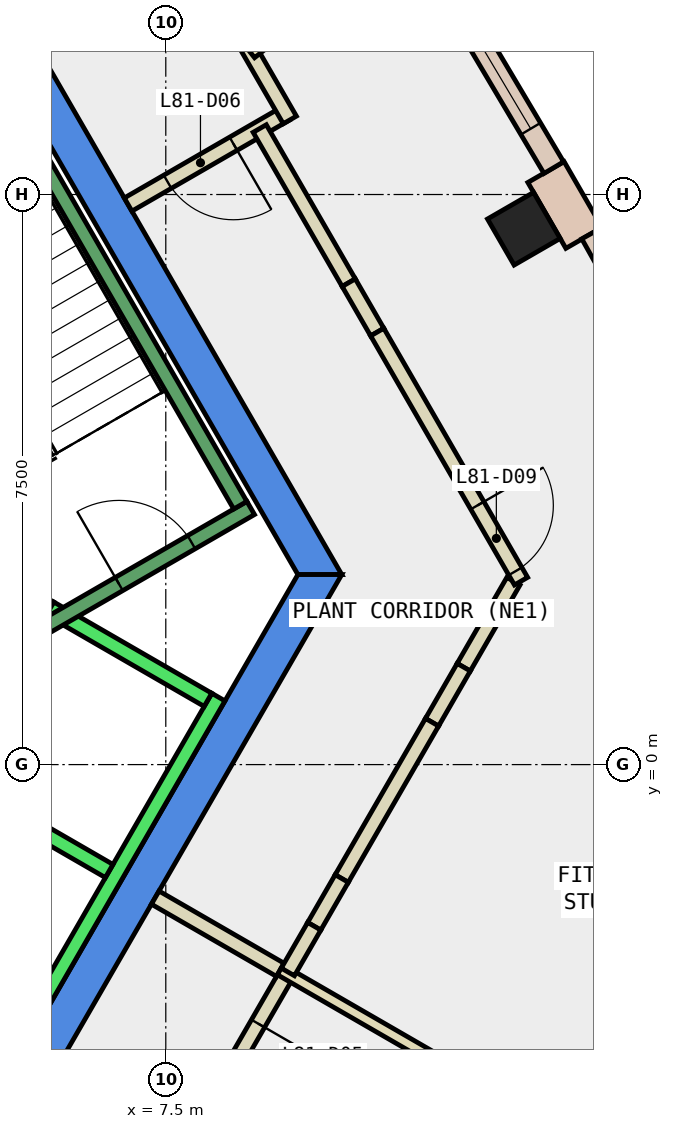
"""IFC4 building model, lengths in metres.
Left out: names, types, materials, properties, quantities, classifications, styles, units other than length and angle.
Written with IfcOpenShell. Run it as: python <this file> out.ifc"""

import sys

from ifc_helpers import new_model, si_unit, direction, frame, frame_2d, origin, origin_2d, place, context, subcontext, project, spatial, polyline, rectangle, outline, extrude, element, fill, save


model = new_model("IFC4")
c1 = context("Model", 3, precision=1e-05, world=origin(), true_north=direction((0.0, 1.0)))
c2 = subcontext(c1, "Body", "Model", "MODEL_VIEW")
j1 = project(units=[si_unit("LENGTHUNIT", "METRE"), si_unit("PLANEANGLEUNIT", "RADIAN")], contexts=[c1])
p1 = place(None, origin())
s1 = spatial("IfcSite", under=j1, at=p1, CompositionType="ELEMENT")
p2 = place(p1, origin())
s2 = spatial("IfcBuilding", under=s1, at=p2, CompositionType="ELEMENT")
p3 = place(p2, frame((0.0, 0.0, 344.9)))
s3 = spatial("IfcBuildingStorey", under=s2, at=p3, CompositionType="ELEMENT", Elevation=344.9)
p4 = place(p3, frame((12.211, 7.05, -0.35), z_axis=(0.0, 0.0, 1.0), x_axis=(-0.5, 0.866025403784, 0.0)))
e1 = element("IfcColumn", 1, at=p4, inside=s3, PredefinedType="COLUMN", context=c2, shape_type="SweptSolid", body=[
    extrude(rectangle(XDim=0.7, YDim=0.7, at=origin_2d()), origin(), (0.0, 0.0, 1.0), 4.4),
])
p5 = place(p3, frame((0.0, 0.0, -0.35)))
e2 = element("IfcWall", 2, at=p5, inside=s3, PredefinedType="SHEAR", context=c2, shape_type="SweptSolid", body=[
    extrude(outline(polyline([(5.486, 9.998), (5.053, 9.748), (9.238, 2.5), (9.815, 2.5), (5.486, 9.998)])), origin(), (0.0, 0.0, 1.0), 4.4),
])
p6 = place(p3, frame((0.0, 0.0, -0.35)))
e3 = element("IfcWall", 3, at=p6, inside=s3, PredefinedType="SHEAR", context=c2, shape_type="SweptSolid", body=[
    extrude(outline(polyline([(4.907, -6.0), (9.815, 2.5), (9.238, 2.5), (4.619, -5.5), (4.907, -6.0)])), origin(), (0.0, 0.0, 1.0), 4.4),
])
p7 = place(p3, frame((13.002, 6.929, 0.0), z_axis=(0.0, 0.0, 1.0), x_axis=(-0.49960277677, 0.866254619292, 0.0)))
e4 = element("IfcWall", 4, at=p7, inside=s3, PredefinedType="STANDARD", context=c2, shape_type="SweptSolid", body=[
    extrude(rectangle(XDim=1.001, YDim=0.55, at=frame_2d((0.5, 0.0))), origin(), (0.0, 0.0, 1.0), 4.05),
])
p8 = place(p3, frame((16.225, 1.426, 0.0), z_axis=(0.0, 0.0, 1.0), x_axis=(-0.489232514948, 0.872153396094, 0.0)))
e5 = element("IfcWall", 5, at=p8, inside=s3, PredefinedType="STANDARD", context=c2, shape_type="SweptSolid", body=[
    extrude(rectangle(XDim=6.38, YDim=0.3, at=frame_2d((3.19, 0.0))), origin(), (0.0, 0.0, 1.0), 4.05),
])
p9 = place(p8, frame((0.595, 0.0, 0.9)))
e6 = element("IfcOpeningElement", 6, at=p9, cuts=e5, PredefinedType="OPENING", context=c2, shape_type="SweptSolid", body=[
    extrude(rectangle(XDim=2.0, YDim=3.0, at=frame_2d((1.0, 1.5))), frame((0.0, 0.16, 0.0), z_axis=(0.0, -1.0, 0.0), x_axis=(1.0, 0.0, 0.0)), (0.0, 0.0, 1.0), 0.32),
])
p10 = place(p8, frame((3.785, 0.0, 0.9)))
e7 = element("IfcOpeningElement", 7, at=p10, cuts=e5, PredefinedType="OPENING", context=c2, shape_type="SweptSolid", body=[
    extrude(rectangle(XDim=2.0, YDim=3.0, at=frame_2d((1.0, 1.5))), frame((0.0, 0.16, 0.0), z_axis=(0.0, -1.0, 0.0), x_axis=(1.0, 0.0, 0.0)), (0.0, 0.0, 1.0), 0.32),
])
p11 = place(p3, frame((12.605, 7.854, 0.0), z_axis=(0.0, 0.0, 1.0), x_axis=(-0.510686403068, 0.859767060152, 0.0)))
e8 = element("IfcWall", 8, at=p11, inside=s3, PredefinedType="STANDARD", context=c2, shape_type="SweptSolid", body=[
    extrude(rectangle(XDim=6.38, YDim=0.3, at=frame_2d((3.19, 0.0))), origin(), (0.0, 0.0, 1.0), 4.05),
])
p12 = place(p11, frame((0.595, 0.0, 0.9)))
e9 = element("IfcOpeningElement", 9, at=p12, cuts=e8, PredefinedType="OPENING", context=c2, shape_type="SweptSolid", body=[
    extrude(rectangle(XDim=2.0, YDim=3.0, at=frame_2d((1.0, 1.5))), frame((0.0, 0.16, 0.0), z_axis=(0.0, -1.0, 0.0), x_axis=(1.0, 0.0, 0.0)), (0.0, 0.0, 1.0), 0.32),
])
p13 = place(p11, frame((3.785, 0.0, 0.9)))
e10 = element("IfcOpeningElement", 10, at=p13, cuts=e8, PredefinedType="OPENING", context=c2, shape_type="SweptSolid", body=[
    extrude(rectangle(XDim=2.0, YDim=3.0, at=frame_2d((1.0, 1.5))), frame((0.0, 0.16, 0.0), z_axis=(0.0, -1.0, 0.0), x_axis=(1.0, 0.0, 0.0)), (0.0, 0.0, 1.0), 0.32),
])
p14 = place(p3, frame((9.106, -2.728, 0.0), z_axis=(0.0, 0.0, 1.0), x_axis=(-0.500246664097, -0.865882945357, 0.0)))
e11 = element("IfcWall", 11, at=p14, inside=s3, PredefinedType="PARTITIONING", context=c2, shape_type="SweptSolid", body=[
    extrude(rectangle(XDim=1.841, YDim=0.2, at=frame_2d((0.92, 0.0))), origin(), (0.0, 0.0, 1.0), 4.05),
])
p15 = place(p14, frame((0.784, 0.0, 0.0)))
e12 = element("IfcOpeningElement", 12, at=p15, cuts=e11, PredefinedType="OPENING", context=c2, shape_type="SweptSolid", body=[
    extrude(rectangle(XDim=1.0, YDim=2.1, at=frame_2d((0.5, 1.05))), frame((0.0, 0.11, 0.0), z_axis=(0.0, -1.0, 0.0), x_axis=(1.0, 0.0, 0.0)), (0.0, 0.0, 1.0), 0.22),
])
p16 = place(p3, frame((7.361, -1.75, 0.0), z_axis=(0.0, 0.0, 1.0), x_axis=(0.865980106173, -0.500078449558, 0.0)))
e13 = element("IfcWall", 13, at=p16, inside=s3, PredefinedType="PARTITIONING", context=c2, shape_type="SweptSolid", body=[
    extrude(rectangle(XDim=1.9, YDim=0.2, at=frame_2d((0.95, 0.0))), origin(), (0.0, 0.0, 1.0), 4.05),
])
p17 = place(p3, frame((9.082, 8.568, 0.0), z_axis=(0.0, 0.0, 1.0), x_axis=(-0.865955154139, -0.50012165622, 0.0)))
e14 = element("IfcWall", 14, at=p17, inside=s3, PredefinedType="PARTITIONING", context=c2, shape_type="SweptSolid", body=[
    extrude(rectangle(XDim=2.4, YDim=0.2, at=frame_2d((1.2, 0.0))), origin(), (0.0, 0.0, 1.0), 4.05),
])
p18 = place(p17, frame((0.8, 0.0, 0.0)))
e15 = element("IfcOpeningElement", 15, at=p18, cuts=e14, PredefinedType="OPENING", context=c2, shape_type="SweptSolid", body=[
    extrude(rectangle(XDim=1.0, YDim=2.1, at=frame_2d((0.5, 1.05))), frame((0.0, 0.11, 0.0), z_axis=(0.0, -1.0, 0.0), x_axis=(1.0, 0.0, 0.0)), (0.0, 0.0, 1.0), 0.22),
])
p19 = place(p3, frame((8.736, 8.368, 0.0), z_axis=(0.0, 0.0, 1.0), x_axis=(0.500041339179, -0.866001535283, 0.0)))
e16 = element("IfcWall", 16, at=p19, inside=s3, PredefinedType="PARTITIONING", context=c2, shape_type="SweptSolid", body=[
    extrude(rectangle(XDim=2.342, YDim=0.2, at=frame_2d((1.171, 0.0))), origin(), (0.0, 0.0, 1.0), 4.05),
])
p20 = place(p3, frame((12.074, 2.413, 0.0), z_axis=(0.0, 0.0, 1.0), x_axis=(-0.500255820348, -0.86587765545, 0.0)))
e17 = element("IfcWall", 17, at=p20, inside=s3, PredefinedType="PARTITIONING", context=c2, shape_type="SweptSolid", body=[
    extrude(rectangle(XDim=1.307, YDim=0.2, at=frame_2d((0.654, 0.0))), origin(), (0.0, 0.0, 1.0), 4.05),
])
p21 = place(p3, frame((18.416, -8.133, 0.0), z_axis=(0.0, 0.0, 1.0), x_axis=(-0.866013839597, 0.500020029225, 0.0)))
e18 = element("IfcWall", 18, at=p21, inside=s3, PredefinedType="PARTITIONING", context=c2, shape_type="SweptSolid", body=[
    extrude(rectangle(XDim=10.866, YDim=0.15, at=frame_2d((5.433, 0.0))), origin(), (0.0, 0.0, 1.0), 4.05),
])
p22 = place(p3, frame((7.482, 11.339, 0.0), z_axis=(0.0, 0.0, 1.0), x_axis=(0.49999780286, -0.8660266723, 0.0)))
e19 = element("IfcWall", 19, at=p22, inside=s3, PredefinedType="PARTITIONING", context=c2, shape_type="SweptSolid", body=[
    extrude(rectangle(XDim=3.3, YDim=0.2, at=frame_2d((1.65, 0.0))), origin(), (0.0, 0.0, 1.0), 4.05),
])
p23 = place(p22, frame((0.08, 0.0, 0.0)))
e20 = element("IfcOpeningElement", 20, at=p23, cuts=e19, PredefinedType="OPENING", context=c2, shape_type="SweptSolid", body=[
    extrude(rectangle(XDim=1.0, YDim=2.1, at=frame_2d((0.5, 1.05))), frame((0.0, 0.11, 0.0), z_axis=(0.0, -1.0, 0.0), x_axis=(1.0, 0.0, 0.0)), (0.0, 0.0, 1.0), 0.22),
])
p24 = place(p3, frame((9.907, 6.34, 0.0), z_axis=(0.0, 0.0, 1.0), x_axis=(0.499637970844, -0.866234320545, 0.0)))
e21 = element("IfcWall", 21, at=p24, inside=s3, PredefinedType="PARTITIONING", context=c2, shape_type="SweptSolid", body=[
    extrude(rectangle(XDim=0.75, YDim=0.2, at=frame_2d((0.375, 0.0))), origin(), (0.0, 0.0, 1.0), 1.95),
])
p25 = place(p3, frame((10.282, 5.69, 0.0), z_axis=(0.0, 0.0, 1.0), x_axis=(0.500038938992, -0.86600292118, 0.0)))
e22 = element("IfcWall", 22, at=p25, inside=s3, PredefinedType="PARTITIONING", context=c2, shape_type="SweptSolid", body=[
    extrude(rectangle(XDim=3.784, YDim=0.2, at=frame_2d((1.892, 0.0))), origin(), (0.0, 0.0, 1.0), 4.05),
])
p26 = place(p25, frame((2.634, 0.0, 0.0)))
e23 = element("IfcOpeningElement", 23, at=p26, cuts=e22, PredefinedType="OPENING", context=c2, shape_type="SweptSolid", body=[
    extrude(rectangle(XDim=1.0, YDim=2.1, at=frame_2d((0.5, 1.05))), frame((0.0, 0.11, 0.0), z_axis=(0.0, -1.0, 0.0), x_axis=(1.0, 0.0, 0.0)), (0.0, 0.0, 1.0), 0.22),
])
p27 = place(p3, frame((11.42, 1.281, 0.0), z_axis=(0.0, 0.0, 1.0), x_axis=(-0.49903093787, -0.866584169627, 0.0)))
e24 = element("IfcWall", 24, at=p27, inside=s3, PredefinedType="PARTITIONING", context=c2, shape_type="SweptSolid", body=[
    extrude(rectangle(XDim=0.836, YDim=0.2, at=frame_2d((0.418, 0.0))), origin(), (0.0, 0.0, 1.0), 1.95),
])
p28 = place(p3, frame((11.003, 0.557, 0.0), z_axis=(0.0, 0.0, 1.0), x_axis=(-0.500318709804, -0.865841318384, 0.0)))
e25 = element("IfcWall", 25, at=p28, inside=s3, PredefinedType="PARTITIONING", context=c2, shape_type="SweptSolid", body=[
    extrude(rectangle(XDim=2.375, YDim=0.2, at=frame_2d((1.187, 0.0))), origin(), (0.0, 0.0, 1.0), 4.05),
])
p29 = place(p3, frame((9.815, -1.499, 0.0), z_axis=(0.0, 0.0, 1.0), x_axis=(-0.499508606083, -0.866308924373, 0.0)))
e26 = element("IfcWall", 26, at=p29, inside=s3, PredefinedType="PARTITIONING", context=c2, shape_type="SweptSolid", body=[
    extrude(rectangle(XDim=0.725, YDim=0.2, at=frame_2d((0.362, 0.0))), origin(), (0.0, 0.0, 1.0), 1.95),
])
p30 = place(p3, frame((9.453, -2.127, 0.0), z_axis=(0.0, 0.0, 1.0), x_axis=(-0.499884866553, -0.866091865907, 0.0)))
e27 = element("IfcWall", 27, at=p30, inside=s3, PredefinedType="PARTITIONING", context=c2, shape_type="SweptSolid", body=[
    extrude(rectangle(XDim=0.694, YDim=0.2, at=frame_2d((0.347, 0.0))), origin(), (0.0, 0.0, 1.0), 4.05),
])
p31 = place(p3, frame((9.821, 10.276, 0.0), z_axis=(0.0, 0.0, 1.0), x_axis=(-0.784249073328, -0.620446122548, 0.0)))
e28 = element("IfcWall", 28, at=p31, inside=s3, PredefinedType="PARTITIONING", context=c2, shape_type="SweptSolid", body=[
    extrude(rectangle(XDim=1.51, YDim=0.1, at=frame_2d((0.755, 0.0))), origin(), (0.0, 0.0, 1.0), 4.05),
])
p32 = place(p3, frame((3.24, -2.488, 0.0), z_axis=(0.0, 0.0, 1.0), x_axis=(0.500034260056, 0.866005622828, 0.0)))
e29 = element("IfcWall", 29, at=p32, inside=s3, PredefinedType="STANDARD", context=c2, shape_type="SweptSolid", body=[
    extrude(rectangle(XDim=5.399, YDim=0.2, at=frame_2d((2.7, 0.0))), origin(), (0.0, 0.0, 1.0), 4.05),
])
p33 = place(p32, frame((3.225, 0.0, 0.0)))
e30 = element("IfcOpeningElement", 30, at=p33, cuts=e29, PredefinedType="OPENING", context=c2, shape_type="SweptSolid", body=[
    extrude(rectangle(XDim=1.1, YDim=2.1, at=frame_2d((0.55, 1.05))), frame((0.0, 0.11, 0.0), z_axis=(0.0, -1.0, 0.0), x_axis=(1.0, 0.0, 0.0)), (0.0, 0.0, 1.0), 0.22),
])
p34 = place(p32, frame((1.225, 0.0, 0.0)))
e31 = element("IfcOpeningElement", 31, at=p34, cuts=e29, PredefinedType="OPENING", context=c2, shape_type="SweptSolid", body=[
    extrude(rectangle(XDim=1.1, YDim=2.1, at=frame_2d((0.55, 1.05))), frame((0.0, 0.11, 0.0), z_axis=(0.0, -1.0, 0.0), x_axis=(1.0, 0.0, 0.0)), (0.0, 0.0, 1.0), 0.22),
])
p35 = place(p3, frame((5.492, -3.788, 0.0), z_axis=(0.0, 0.0, 1.0), x_axis=(0.500034260056, 0.866005622828, 0.0)))
e32 = element("IfcWall", 32, at=p35, inside=s3, PredefinedType="STANDARD", context=c2, shape_type="SweptSolid", body=[
    extrude(rectangle(XDim=5.399, YDim=0.2, at=frame_2d((2.7, 0.0))), origin(), (0.0, 0.0, 1.0), 4.05),
])
for number, where, z_axis, x_axis in (
    (33, (4.677, -0.2, 0.0), (0.0, 0.0, 1.0), (0.866, -0.5, 0.0)),
    (34, (5.977, 2.052, 0.0), (0.0, 0.0, 1.0), (0.866, -0.5, 0.0)),
):
    element("IfcWall", number, at=place(p3, frame(where, z_axis=z_axis, x_axis=x_axis)), inside=s3, PredefinedType="STANDARD", context=c2, shape_type="SweptSolid", body=[
        extrude(rectangle(XDim=2.399, YDim=0.2, at=frame_2d((1.2, 0.0))), origin(), (0.0, 0.0, 1.0), 4.05),
    ])
p36 = place(p3, frame((4.806, 1.176, 0.0), z_axis=(0.0, 0.0, 1.0), x_axis=(0.866059941101, 0.499940174841, 0.0)))
e35 = element("IfcWall", 35, at=p36, inside=s3, PredefinedType="STANDARD", context=c2, shape_type="SweptSolid", body=[
    extrude(rectangle(XDim=4.4, YDim=0.2, at=frame_2d((2.2, 0.0))), origin(), (0.0, 0.0, 1.0), 4.05),
])
p37 = place(p36, frame((2.4, 0.0, 0.0)))
e36 = element("IfcOpeningElement", 36, at=p37, cuts=e35, PredefinedType="OPENING", context=c2, shape_type="SweptSolid", body=[
    extrude(rectangle(XDim=1.1, YDim=2.2, at=frame_2d((0.55, 1.1))), frame((0.0, 0.11, 0.0), z_axis=(0.0, -1.0, 0.0), x_axis=(1.0, 0.0, 0.0)), (0.0, 0.0, 1.0), 0.22),
])
p38 = place(p3, frame((8.48, 3.412, 0.0), z_axis=(0.0, 0.0, 1.0), x_axis=(-0.499978703459, 0.866037698999, 0.0)))
e37 = element("IfcWall", 37, at=p38, inside=s3, PredefinedType="STANDARD", context=c2, shape_type="SweptSolid", body=[
    extrude(rectangle(XDim=6.9, YDim=0.2, at=frame_2d((3.45, 0.0))), origin(), (0.0, 0.0, 1.0), 4.05),
])
p39 = place(p12, origin())
e38 = element("IfcWindow", 38, at=p39, inside=s3, PartitioningType="SINGLE_PANEL", PredefinedType="WINDOW", context=c2, shape_type="SweptSolid", body=[
    extrude(rectangle(XDim=2.0, YDim=3.0, at=frame_2d((1.0, 1.5))), frame((0.0, 0.03, 0.0), z_axis=(0.0, -1.0, 0.0), x_axis=(1.0, 0.0, 0.0)), (0.0, 0.0, 1.0), 0.06),
])
fill(e9, e38)
p40 = place(p15, origin())
e39 = element("IfcDoor", 39, at=p40, inside=s3, OperationType="SINGLE_SWING_LEFT", PredefinedType="DOOR", context=c2, shape_type="SweptSolid", body=[
    extrude(rectangle(XDim=1.0, YDim=2.1, at=frame_2d((0.5, 1.05))), frame((0.0, 0.025, 0.0), z_axis=(0.0, -1.0, 0.0), x_axis=(1.0, 0.0, 0.0)), (0.0, 0.0, 1.0), 0.05),
])
fill(e12, e39)
p41 = place(p18, origin())
e40 = element("IfcDoor", 40, at=p41, inside=s3, OperationType="SINGLE_SWING_LEFT", PredefinedType="DOOR", context=c2, shape_type="SweptSolid", body=[
    extrude(rectangle(XDim=1.0, YDim=2.1, at=frame_2d((0.5, 1.05))), frame((0.0, 0.025, 0.0), z_axis=(0.0, -1.0, 0.0), x_axis=(1.0, 0.0, 0.0)), (0.0, 0.0, 1.0), 0.05),
])
fill(e15, e40)
p42 = place(p26, origin())
e41 = element("IfcDoor", 41, at=p42, inside=s3, OperationType="SINGLE_SWING_RIGHT", PredefinedType="DOOR", context=c2, shape_type="SweptSolid", body=[
    extrude(rectangle(XDim=1.0, YDim=2.1, at=frame_2d((0.5, 1.05))), frame((0.0, 0.025, 0.0), z_axis=(0.0, -1.0, 0.0), x_axis=(1.0, 0.0, 0.0)), (0.0, 0.0, 1.0), 0.05),
])
fill(e23, e41)
p43 = place(p37, origin())
e42 = element("IfcDoor", 42, at=p43, inside=s3, OperationType="SINGLE_SWING_LEFT", PredefinedType="DOOR", context=c2, shape_type="SweptSolid", body=[
    extrude(rectangle(XDim=1.1, YDim=2.2, at=frame_2d((0.55, 1.1))), frame((0.0, 0.025, 0.0), z_axis=(0.0, -1.0, 0.0), x_axis=(1.0, 0.0, 0.0)), (0.0, 0.0, 1.0), 0.05),
])
fill(e36, e42)
save(model, sys.argv[1])
